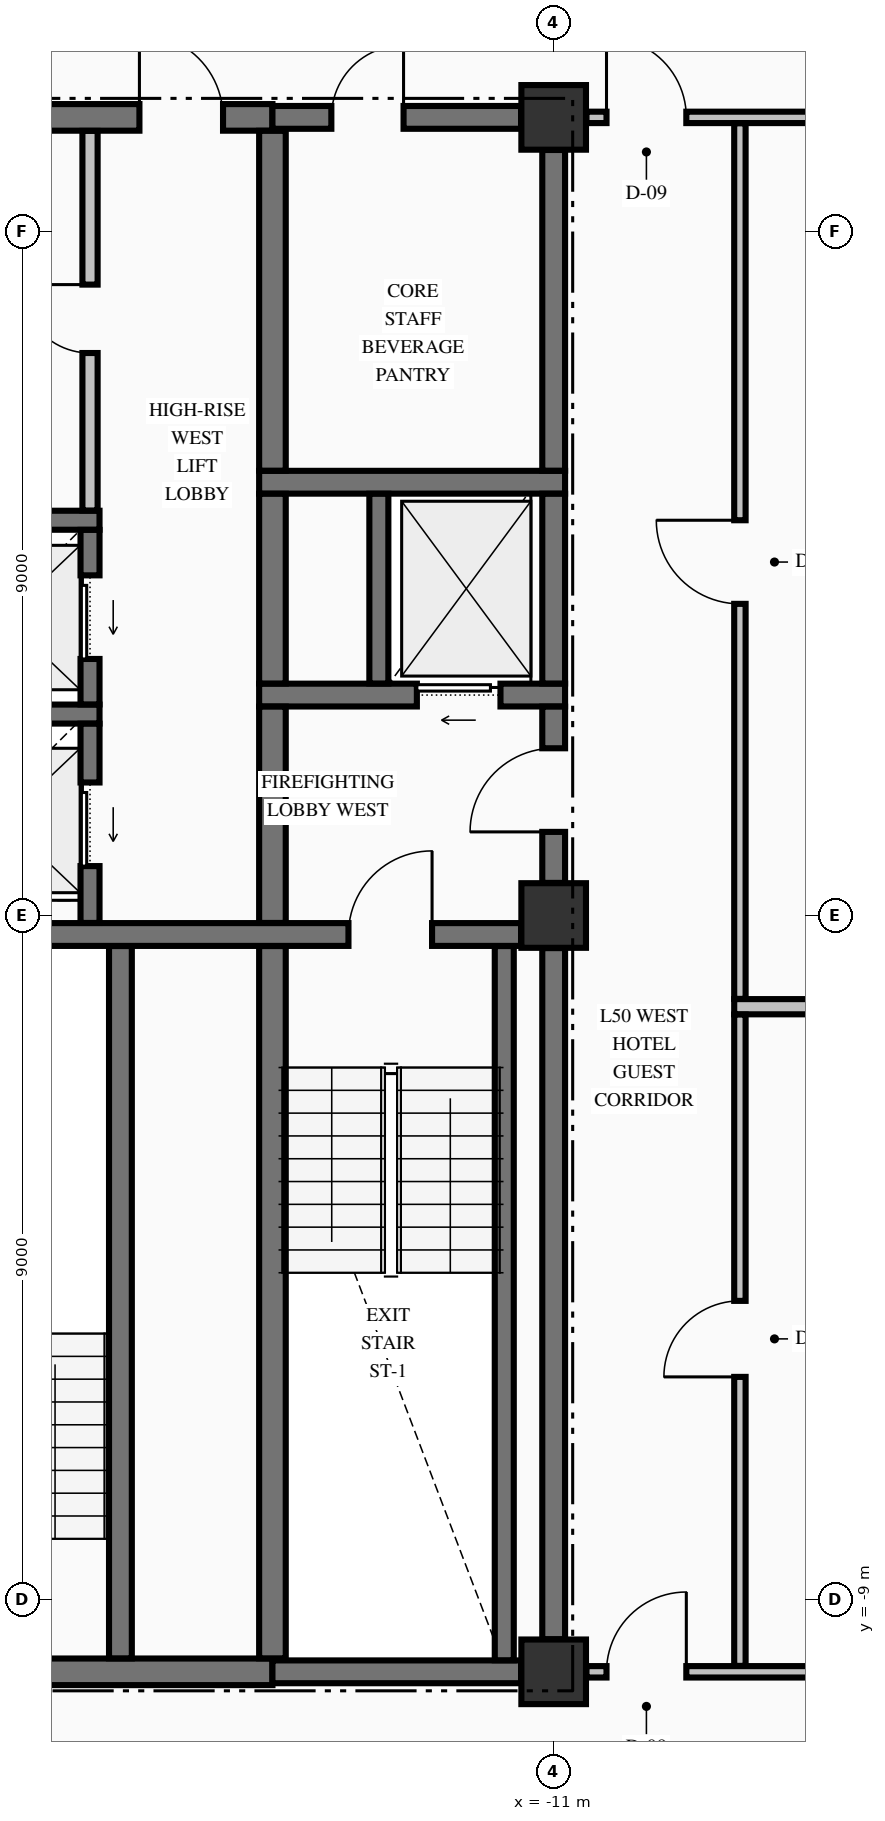
"""IFC4 building model, lengths in metres.
Left out: names, types, materials, properties, quantities, classifications, styles, units other than length and angle.
Written with IfcOpenShell. Run it as: python <this file> out.ifc"""

import sys

from ifc_helpers import new_model, si_unit, direction, frame, frame_2d, origin, origin_2d, place, context, subcontext, project, spatial, rectangle, extrude, element, fill, save


model = new_model("IFC4")
c1 = context("Model", 3, precision=1e-05, world=origin(), true_north=direction((0.0, 1.0)))
c2 = subcontext(c1, "Body", "Model", "MODEL_VIEW")
j1 = project(units=[si_unit("LENGTHUNIT", "METRE"), si_unit("PLANEANGLEUNIT", "RADIAN")], contexts=[c1])
p1 = place(None, origin())
s1 = spatial("IfcSite", under=j1, at=p1, CompositionType="ELEMENT")
p2 = place(p1, origin())
s2 = spatial("IfcBuilding", under=s1, at=p2, CompositionType="ELEMENT")
p3 = place(p2, frame((0.0, 0.0, 194.86)))
s3 = spatial("IfcBuildingStorey", under=s2, at=p3, CompositionType="ELEMENT", Elevation=194.86)
for number, where, z_axis, x_axis in (
    (1, (-11.0, -9.95, -0.275), (0.0, 0.0, 1.0), (1.0, 0.0, 0.0)),
    (2, (-11.0, 0.0, -0.275), (0.0, 0.0, 1.0), (1.0, 0.0, 0.0)),
    (3, (-11.0, 10.5, -0.275), (0.0, 0.0, 1.0), (1.0, 0.0, 0.0)),
):
    element("IfcColumn", number, at=place(p3, frame(where, z_axis=z_axis, x_axis=x_axis)), inside=s3, PredefinedType="COLUMN", context=c2, shape_type="SweptSolid", body=[
        extrude(rectangle(XDim=0.85, YDim=0.85, at=origin_2d()), origin(), (0.0, 0.0, 1.0), 3.425),
    ])
p4 = place(p3, frame((-19.571, -9.95, 0.0), z_axis=(0.0, 0.0, 1.0), x_axis=(1.0, 0.0, 0.0)))
e4 = element("IfcWall", 4, at=p4, inside=s3, PredefinedType="SHEAR", context=c2, shape_type="SweptSolid", body=[
    extrude(rectangle(XDim=4.871, YDim=0.35, at=frame_2d((2.436, 0.0))), origin(), (0.0, 0.0, 1.0), 3.15),
])
p5 = place(p4, frame((0.746, 0.0, 0.0)))
e5 = element("IfcOpeningElement", 5, at=p5, cuts=e4, PredefinedType="OPENING", context=c2, shape_type="SweptSolid", body=[
    extrude(rectangle(XDim=1.05, YDim=2.15, at=frame_2d((0.525, 1.075))), frame((0.0, 0.185, 0.0), z_axis=(0.0, -1.0, 0.0), x_axis=(1.0, 0.0, 0.0)), (0.0, 0.0, 1.0), 0.37),
])
p6 = place(p3, frame((-14.7, -9.95, 0.0), z_axis=(0.0, 0.0, 1.0), x_axis=(1.0, 0.0, 0.0)))
e6 = element("IfcWall", 6, at=p6, inside=s3, PredefinedType="SHEAR", context=c2, shape_type="SweptSolid", body=[
    extrude(rectangle(XDim=3.271, YDim=0.3, at=frame_2d((1.635, 0.0))), origin(), (0.0, 0.0, 1.0), 3.15),
])
p7 = place(p3, frame((-19.571, -0.25, 0.0), z_axis=(0.0, 0.0, 1.0), x_axis=(1.0, 0.0, 0.0)))
e7 = element("IfcWall", 7, at=p7, inside=s3, PredefinedType="SHEAR", context=c2, shape_type="SweptSolid", body=[
    extrude(rectangle(XDim=8.142, YDim=0.3, at=frame_2d((4.071, 0.0))), origin(), (0.0, 0.0, 1.0), 3.15),
])
p8 = place(p7, frame((5.871, 0.0, 0.0)))
e8 = element("IfcOpeningElement", 8, at=p8, cuts=e7, PredefinedType="OPENING", context=c2, shape_type="SweptSolid", body=[
    extrude(rectangle(XDim=1.1, YDim=2.15, at=frame_2d((0.55, 1.075))), frame((0.0, 0.16, 0.0), z_axis=(0.0, -1.0, 0.0), x_axis=(1.0, 0.0, 0.0)), (0.0, 0.0, 1.0), 0.32),
])
p9 = place(p3, frame((-20.175, 2.65, 0.0), z_axis=(0.0, 0.0, 1.0), x_axis=(1.0, 0.0, 0.0)))
e9 = element("IfcWall", 9, at=p9, inside=s3, PredefinedType="SOLIDWALL", context=c2, shape_type="SweptSolid", body=[
    extrude(rectangle(XDim=3.2, YDim=0.25, at=frame_2d((1.6, 0.0))), origin(), (0.0, 0.0, 1.0), 3.15),
])
p10 = place(p3, frame((-14.875, 2.9, 0.0), z_axis=(0.0, 0.0, 1.0), x_axis=(1.0, 0.0, 0.0)))
e10 = element("IfcWall", 10, at=p10, inside=s3, PredefinedType="SHEAR", context=c2, shape_type="SweptSolid", body=[
    extrude(rectangle(XDim=4.025, YDim=0.3, at=frame_2d((2.012, 0.0))), origin(), (0.0, 0.0, 1.0), 3.15),
])
p11 = place(p10, frame((2.075, 0.0, 0.0)))
e11 = element("IfcOpeningElement", 11, at=p11, cuts=e10, PredefinedType="OPENING", context=c2, shape_type="SweptSolid", body=[
    extrude(rectangle(XDim=1.1, YDim=2.2, at=frame_2d((0.55, 1.1))), frame((0.0, 0.16, 0.0), z_axis=(0.0, -1.0, 0.0), x_axis=(1.0, 0.0, 0.0)), (0.0, 0.0, 1.0), 0.32),
])
p12 = place(p3, frame((-20.175, 5.2, 0.0), z_axis=(0.0, 0.0, 1.0), x_axis=(1.0, 0.0, 0.0)))
e12 = element("IfcWall", 12, at=p12, inside=s3, PredefinedType="SOLIDWALL", context=c2, shape_type="SweptSolid", body=[
    extrude(rectangle(XDim=3.2, YDim=0.25, at=frame_2d((1.6, 0.0))), origin(), (0.0, 0.0, 1.0), 3.15),
])
p13 = place(p3, frame((-14.875, 5.7, 0.0), z_axis=(0.0, 0.0, 1.0), x_axis=(1.0, 0.0, 0.0)))
e13 = element("IfcWall", 13, at=p13, inside=s3, PredefinedType="SHEAR", context=c2, shape_type="SweptSolid", body=[
    extrude(rectangle(XDim=4.025, YDim=0.3, at=frame_2d((2.012, 0.0))), origin(), (0.0, 0.0, 1.0), 3.15),
])
p14 = place(p3, frame((-19.571, 10.5, 0.0), z_axis=(0.0, 0.0, 1.0), x_axis=(1.0, 0.0, 0.0)))
e14 = element("IfcWall", 14, at=p14, inside=s3, PredefinedType="SHEAR", context=c2, shape_type="SweptSolid", body=[
    extrude(rectangle(XDim=4.871, YDim=0.35, at=frame_2d((2.436, 0.0))), origin(), (0.0, 0.0, 1.0), 3.15),
])
p15 = place(p14, frame((3.121, 0.0, 0.0)))
e15 = element("IfcOpeningElement", 15, at=p15, cuts=e14, PredefinedType="OPENING", context=c2, shape_type="SweptSolid", body=[
    extrude(rectangle(XDim=1.1, YDim=2.15, at=frame_2d((0.55, 1.075))), frame((0.0, 0.185, 0.0), z_axis=(0.0, -1.0, 0.0), x_axis=(1.0, 0.0, 0.0)), (0.0, 0.0, 1.0), 0.37),
])
p16 = place(p3, frame((-14.7, 10.5, 0.0), z_axis=(0.0, 0.0, 1.0), x_axis=(1.0, 0.0, 0.0)))
e16 = element("IfcWall", 16, at=p16, inside=s3, PredefinedType="SHEAR", context=c2, shape_type="SweptSolid", body=[
    extrude(rectangle(XDim=3.271, YDim=0.3, at=frame_2d((1.635, 0.0))), origin(), (0.0, 0.0, 1.0), 3.15),
])
p17 = place(p16, frame((0.775, 0.0, 0.0)))
e17 = element("IfcOpeningElement", 17, at=p17, cuts=e16, PredefinedType="OPENING", context=c2, shape_type="SweptSolid", body=[
    extrude(rectangle(XDim=0.95, YDim=2.15, at=frame_2d((0.475, 1.075))), frame((0.0, 0.16, 0.0), z_axis=(0.0, -1.0, 0.0), x_axis=(1.0, 0.0, 0.0)), (0.0, 0.0, 1.0), 0.32),
])
p18 = place(p3, frame((-10.569, -9.95, 0.0), z_axis=(0.0, 0.0, 1.0), x_axis=(1.0, 0.0, 0.0)))
e18 = element("IfcWall", 18, at=p18, inside=s3, PredefinedType="PARTITIONING", context=c2, shape_type="SweptSolid", body=[
    extrude(rectangle(XDim=21.138, YDim=0.15, at=frame_2d((10.569, 0.0))), origin(), (0.0, 0.0, 1.0), 3.15),
])
p19 = place(p18, frame((0.264, 0.0, 0.0)))
e19 = element("IfcOpeningElement", 19, at=p19, cuts=e18, PredefinedType="OPENING", context=c2, shape_type="SweptSolid", body=[
    extrude(rectangle(XDim=1.05, YDim=2.15, at=frame_2d((0.525, 1.075))), frame((0.0, 0.085, 0.0), z_axis=(0.0, -1.0, 0.0), x_axis=(1.0, 0.0, 0.0)), (0.0, 0.0, 1.0), 0.17),
])
p20 = place(p18, frame((19.824, 0.0, 0.0)))
e20 = element("IfcOpeningElement", 20, at=p20, cuts=e18, PredefinedType="OPENING", context=c2, shape_type="SweptSolid", body=[
    extrude(rectangle(XDim=1.05, YDim=2.15, at=frame_2d((0.525, 1.075))), frame((0.0, 0.085, 0.0), z_axis=(0.0, -1.0, 0.0), x_axis=(1.0, 0.0, 0.0)), (0.0, 0.0, 1.0), 0.17),
])
p21 = place(p18, frame((12.874, 0.0, 0.0)))
e21 = element("IfcOpeningElement", 21, at=p21, cuts=e18, PredefinedType="OPENING", context=c2, shape_type="SweptSolid", body=[
    extrude(rectangle(XDim=0.95, YDim=2.15, at=frame_2d((0.475, 1.075))), frame((0.0, 0.085, 0.0), z_axis=(0.0, -1.0, 0.0), x_axis=(1.0, 0.0, 0.0)), (0.0, 0.0, 1.0), 0.17),
])
p22 = place(p3, frame((-8.625, -1.2, 0.0), z_axis=(0.0, 0.0, 1.0), x_axis=(1.0, 0.0, 0.0)))
e22 = element("IfcWall", 22, at=p22, inside=s3, PredefinedType="PARTITIONING", context=c2, shape_type="SweptSolid", body=[
    extrude(rectangle(XDim=8.725, YDim=0.2, at=frame_2d((4.363, 0.0))), origin(), (0.0, 0.0, 1.0), 3.15),
])
p23 = place(p3, frame((-10.569, 10.5, 0.0), z_axis=(0.0, 0.0, 1.0), x_axis=(1.0, 0.0, 0.0)))
e23 = element("IfcWall", 23, at=p23, inside=s3, PredefinedType="PARTITIONING", context=c2, shape_type="SweptSolid", body=[
    extrude(rectangle(XDim=21.138, YDim=0.15, at=frame_2d((10.569, 0.0))), origin(), (0.0, 0.0, 1.0), 3.15),
])
p24 = place(p23, frame((0.264, 0.0, 0.0)))
e24 = element("IfcOpeningElement", 24, at=p24, cuts=e23, PredefinedType="OPENING", context=c2, shape_type="SweptSolid", body=[
    extrude(rectangle(XDim=1.05, YDim=2.15, at=frame_2d((0.525, 1.075))), frame((0.0, 0.085, 0.0), z_axis=(0.0, -1.0, 0.0), x_axis=(1.0, 0.0, 0.0)), (0.0, 0.0, 1.0), 0.17),
])
p25 = place(p23, frame((19.824, 0.0, 0.0)))
e25 = element("IfcOpeningElement", 25, at=p25, cuts=e23, PredefinedType="OPENING", context=c2, shape_type="SweptSolid", body=[
    extrude(rectangle(XDim=1.05, YDim=2.15, at=frame_2d((0.525, 1.075))), frame((0.0, 0.085, 0.0), z_axis=(0.0, -1.0, 0.0), x_axis=(1.0, 0.0, 0.0)), (0.0, 0.0, 1.0), 0.17),
])
p26 = place(p3, frame((-17.1, -0.098, 0.0), z_axis=(0.0, 0.0, 1.0), x_axis=(0.0, 1.0, 0.0)))
e26 = element("IfcWall", 26, at=p26, inside=s3, PredefinedType="SOLIDWALL", context=c2, shape_type="SweptSolid", body=[
    extrude(rectangle(XDim=2.621, YDim=0.25, at=frame_2d((1.311, 0.0))), origin(), (0.0, 0.0, 1.0), 3.15),
])
p27 = place(p26, frame((0.748, 0.0, 0.0)))
e27 = element("IfcOpeningElement", 27, at=p27, cuts=e26, PredefinedType="OPENING", context=c2, shape_type="SweptSolid", body=[
    extrude(rectangle(XDim=1.1, YDim=2.2, at=frame_2d((0.55, 1.1))), frame((0.0, 0.135, 0.0), z_axis=(0.0, -1.0, 0.0), x_axis=(1.0, 0.0, 0.0)), (0.0, 0.0, 1.0), 0.27),
])
p28 = place(p3, frame((-17.1, 2.777, 0.0), z_axis=(0.0, 0.0, 1.0), x_axis=(0.0, 1.0, 0.0)))
e28 = element("IfcWall", 28, at=p28, inside=s3, PredefinedType="SOLIDWALL", context=c2, shape_type="SweptSolid", body=[
    extrude(rectangle(XDim=2.296, YDim=0.25, at=frame_2d((1.148, 0.0))), origin(), (0.0, 0.0, 1.0), 3.15),
])
p29 = place(p28, frame((0.598, 0.0, 0.0)))
e29 = element("IfcOpeningElement", 29, at=p29, cuts=e28, PredefinedType="OPENING", context=c2, shape_type="SweptSolid", body=[
    extrude(rectangle(XDim=1.1, YDim=2.2, at=frame_2d((0.55, 1.1))), frame((0.0, 0.135, 0.0), z_axis=(0.0, -1.0, 0.0), x_axis=(1.0, 0.0, 0.0)), (0.0, 0.0, 1.0), 0.27),
])
p30 = place(p3, frame((-16.7, -9.773, 0.0), z_axis=(0.0, 0.0, 1.0), x_axis=(0.0, 1.0, 0.0)))
e30 = element("IfcWall", 30, at=p30, inside=s3, PredefinedType="SHEAR", context=c2, shape_type="SweptSolid", body=[
    extrude(rectangle(XDim=9.371, YDim=0.3, at=frame_2d((4.686, 0.0))), origin(), (0.0, 0.0, 1.0), 3.15),
])
p31 = place(p3, frame((-14.7, -9.773, 0.0), z_axis=(0.0, 0.0, 1.0), x_axis=(0.0, 1.0, 0.0)))
e31 = element("IfcWall", 31, at=p31, inside=s3, PredefinedType="SHEAR", context=c2, shape_type="SweptSolid", body=[
    extrude(rectangle(XDim=9.371, YDim=0.35, at=frame_2d((4.686, 0.0))), origin(), (0.0, 0.0, 1.0), 3.15),
])
p32 = place(p3, frame((-14.7, -0.098, 0.0), z_axis=(0.0, 0.0, 1.0), x_axis=(0.0, 1.0, 0.0)))
e32 = element("IfcWall", 32, at=p32, inside=s3, PredefinedType="SHEAR", context=c2, shape_type="SweptSolid", body=[
    extrude(rectangle(XDim=2.846, YDim=0.35, at=frame_2d((1.423, 0.0))), origin(), (0.0, 0.0, 1.0), 3.15),
])
p33 = place(p3, frame((-14.7, 3.052, 0.0), z_axis=(0.0, 0.0, 1.0), x_axis=(0.0, 1.0, 0.0)))
e33 = element("IfcWall", 33, at=p33, inside=s3, PredefinedType="SHEAR", context=c2, shape_type="SweptSolid", body=[
    extrude(rectangle(XDim=2.496, YDim=0.35, at=frame_2d((1.248, 0.0))), origin(), (0.0, 0.0, 1.0), 3.15),
])
p34 = place(p3, frame((-14.7, 5.852, 0.0), z_axis=(0.0, 0.0, 1.0), x_axis=(0.0, 1.0, 0.0)))
e34 = element("IfcWall", 34, at=p34, inside=s3, PredefinedType="SHEAR", context=c2, shape_type="SweptSolid", body=[
    extrude(rectangle(XDim=4.471, YDim=0.35, at=frame_2d((2.235, 0.0))), origin(), (0.0, 0.0, 1.0), 3.15),
])
p35 = place(p3, frame((-13.3, 3.052, 0.0), z_axis=(0.0, 0.0, 1.0), x_axis=(0.0, 1.0, 0.0)))
e35 = element("IfcWall", 35, at=p35, inside=s3, PredefinedType="SOLIDWALL", context=c2, shape_type="SweptSolid", body=[
    extrude(rectangle(XDim=2.496, YDim=0.25, at=frame_2d((1.248, 0.0))), origin(), (0.0, 0.0, 1.0), 3.15),
])
p36 = place(p3, frame((-11.65, -9.798, 0.0), z_axis=(0.0, 0.0, 1.0), x_axis=(0.0, 1.0, 0.0)))
e36 = element("IfcWall", 36, at=p36, inside=s3, PredefinedType="SOLIDWALL", context=c2, shape_type="SweptSolid", body=[
    extrude(rectangle(XDim=9.396, YDim=0.25, at=frame_2d((4.698, 0.0))), origin(), (0.0, 0.0, 1.0), 3.15),
])
p37 = place(p3, frame((-11.0, -9.521, 0.0), z_axis=(0.0, 0.0, 1.0), x_axis=(0.0, 1.0, 0.0)))
e37 = element("IfcWall", 37, at=p37, inside=s3, PredefinedType="SHEAR", context=c2, shape_type="SweptSolid", body=[
    extrude(rectangle(XDim=9.092, YDim=0.3, at=frame_2d((4.546, 0.0))), origin(), (0.0, 0.0, 1.0), 3.15),
])
p38 = place(p3, frame((-11.0, 0.429, 0.0), z_axis=(0.0, 0.0, 1.0), x_axis=(0.0, 1.0, 0.0)))
e38 = element("IfcWall", 38, at=p38, inside=s3, PredefinedType="SHEAR", context=c2, shape_type="SweptSolid", body=[
    extrude(rectangle(XDim=2.319, YDim=0.3, at=frame_2d((1.16, 0.0))), origin(), (0.0, 0.0, 1.0), 3.15),
])
p39 = place(p38, frame((0.671, 0.0, 0.0)))
e39 = element("IfcOpeningElement", 39, at=p39, cuts=e38, PredefinedType="OPENING", context=c2, shape_type="SweptSolid", body=[
    extrude(rectangle(XDim=1.1, YDim=2.15, at=frame_2d((0.55, 1.075))), frame((0.0, 0.16, 0.0), z_axis=(0.0, -1.0, 0.0), x_axis=(1.0, 0.0, 0.0)), (0.0, 0.0, 1.0), 0.32),
])
p40 = place(p3, frame((-11.0, 3.052, 0.0), z_axis=(0.0, 0.0, 1.0), x_axis=(0.0, 1.0, 0.0)))
e40 = element("IfcWall", 40, at=p40, inside=s3, PredefinedType="SHEAR", context=c2, shape_type="SweptSolid", body=[
    extrude(rectangle(XDim=2.496, YDim=0.3, at=frame_2d((1.248, 0.0))), origin(), (0.0, 0.0, 1.0), 3.15),
])
p41 = place(p3, frame((-11.0, 5.852, 0.0), z_axis=(0.0, 0.0, 1.0), x_axis=(0.0, 1.0, 0.0)))
e41 = element("IfcWall", 41, at=p41, inside=s3, PredefinedType="SHEAR", context=c2, shape_type="SweptSolid", body=[
    extrude(rectangle(XDim=4.219, YDim=0.3, at=frame_2d((2.109, 0.0))), origin(), (0.0, 0.0, 1.0), 3.15),
])
p42 = place(p3, frame((-17.1, 5.328, 0.0), z_axis=(0.0, 0.0, 1.0), x_axis=(0.0, 1.0, 0.0)))
e42 = element("IfcWall", 42, at=p42, inside=s3, PredefinedType="PARTITIONING", context=c2, shape_type="SweptSolid", body=[
    extrude(rectangle(XDim=4.994, YDim=0.2, at=frame_2d((2.497, 0.0))), origin(), (0.0, 0.0, 1.0), 3.15),
])
p43 = place(p42, frame((2.072, 0.0, 0.0)))
e43 = element("IfcOpeningElement", 43, at=p43, cuts=e42, PredefinedType="OPENING", context=c2, shape_type="SweptSolid", body=[
    extrude(rectangle(XDim=0.9, YDim=2.15, at=frame_2d((0.45, 1.075))), frame((0.0, 0.11, 0.0), z_axis=(0.0, -1.0, 0.0), x_axis=(1.0, 0.0, 0.0)), (0.0, 0.0, 1.0), 0.22),
])
p44 = place(p3, frame((-8.55, -9.872, 0.0), z_axis=(0.0, 0.0, 1.0), x_axis=(0.0, 1.0, 0.0)))
e44 = element("IfcWall", 44, at=p44, inside=s3, PredefinedType="PARTITIONING", context=c2, shape_type="SweptSolid", body=[
    extrude(rectangle(XDim=8.569, YDim=0.15, at=frame_2d((4.285, 0.0))), origin(), (0.0, 0.0, 1.0), 3.15),
])
p45 = place(p44, frame((3.802, 0.0, 0.0)))
e45 = element("IfcOpeningElement", 45, at=p45, cuts=e44, PredefinedType="OPENING", context=c2, shape_type="SweptSolid", body=[
    extrude(rectangle(XDim=1.0, YDim=2.15, at=frame_2d((0.5, 1.075))), frame((0.0, 0.085, 0.0), z_axis=(0.0, -1.0, 0.0), x_axis=(1.0, 0.0, 0.0)), (0.0, 0.0, 1.0), 0.17),
])
p46 = place(p3, frame((-8.55, -1.097, 0.0), z_axis=(0.0, 0.0, 1.0), x_axis=(0.0, 1.0, 0.0)))
e46 = element("IfcWall", 46, at=p46, inside=s3, PredefinedType="PARTITIONING", context=c2, shape_type="SweptSolid", body=[
    extrude(rectangle(XDim=11.519, YDim=0.15, at=frame_2d((5.76, 0.0))), origin(), (0.0, 0.0, 1.0), 3.15),
])
p47 = place(p46, frame((5.197, 0.0, 0.0)))
e47 = element("IfcOpeningElement", 47, at=p47, cuts=e46, PredefinedType="OPENING", context=c2, shape_type="SweptSolid", body=[
    extrude(rectangle(XDim=1.1, YDim=2.15, at=frame_2d((0.55, 1.075))), frame((0.0, 0.085, 0.0), z_axis=(0.0, -1.0, 0.0), x_axis=(1.0, 0.0, 0.0)), (0.0, 0.0, 1.0), 0.17),
])
p48 = place(p8, origin())
e48 = element("IfcDoor", 48, at=p48, inside=s3, OperationType="SINGLE_SWING_RIGHT", PredefinedType="DOOR", context=c2, shape_type="SweptSolid", body=[
    extrude(rectangle(XDim=1.1, YDim=2.15, at=frame_2d((0.55, 1.075))), frame((0.0, 0.025, 0.0), z_axis=(0.0, -1.0, 0.0), x_axis=(1.0, 0.0, 0.0)), (0.0, 0.0, 1.0), 0.05),
])
fill(e8, e48)
p49 = place(p39, origin())
e49 = element("IfcDoor", 49, at=p49, inside=s3, OperationType="SINGLE_SWING_LEFT", PredefinedType="DOOR", context=c2, shape_type="SweptSolid", body=[
    extrude(rectangle(XDim=1.1, YDim=2.15, at=frame_2d((0.55, 1.075))), frame((0.0, 0.025, 0.0), z_axis=(0.0, -1.0, 0.0), x_axis=(1.0, 0.0, 0.0)), (0.0, 0.0, 1.0), 0.05),
])
fill(e39, e49)
p50 = place(p11, origin())
e50 = element("IfcDoor", 50, at=p50, inside=s3, OperationType="SLIDING_TO_LEFT", PredefinedType="DOOR", context=c2, shape_type="SweptSolid", body=[
    extrude(rectangle(XDim=1.1, YDim=2.2, at=frame_2d((0.55, 1.1))), frame((0.0, 0.025, 0.0), z_axis=(0.0, -1.0, 0.0), x_axis=(1.0, 0.0, 0.0)), (0.0, 0.0, 1.0), 0.05),
])
fill(e11, e50)
p51 = place(p17, origin())
e51 = element("IfcDoor", 51, at=p51, inside=s3, OperationType="SINGLE_SWING_RIGHT", PredefinedType="DOOR", context=c2, shape_type="SweptSolid", body=[
    extrude(rectangle(XDim=0.95, YDim=2.15, at=frame_2d((0.475, 1.075))), frame((0.0, 0.025, 0.0), z_axis=(0.0, -1.0, 0.0), x_axis=(1.0, 0.0, 0.0)), (0.0, 0.0, 1.0), 0.05),
])
fill(e17, e51)
p52 = place(p27, origin())
e52 = element("IfcDoor", 52, at=p52, inside=s3, OperationType="SLIDING_TO_LEFT", PredefinedType="DOOR", context=c2, shape_type="SweptSolid", body=[
    extrude(rectangle(XDim=1.1, YDim=2.2, at=frame_2d((0.55, 1.1))), frame((0.0, 0.025, 0.0), z_axis=(0.0, -1.0, 0.0), x_axis=(1.0, 0.0, 0.0)), (0.0, 0.0, 1.0), 0.05),
])
fill(e27, e52)
p53 = place(p29, origin())
e53 = element("IfcDoor", 53, at=p53, inside=s3, OperationType="SLIDING_TO_LEFT", PredefinedType="DOOR", context=c2, shape_type="SweptSolid", body=[
    extrude(rectangle(XDim=1.1, YDim=2.2, at=frame_2d((0.55, 1.1))), frame((0.0, 0.025, 0.0), z_axis=(0.0, -1.0, 0.0), x_axis=(1.0, 0.0, 0.0)), (0.0, 0.0, 1.0), 0.05),
])
fill(e29, e53)
p54 = place(p15, origin())
e54 = element("IfcDoor", 54, at=p54, inside=s3, OperationType="SINGLE_SWING_LEFT", PredefinedType="DOOR", context=c2, shape_type="SweptSolid", body=[
    extrude(rectangle(XDim=1.1, YDim=2.15, at=frame_2d((0.55, 1.075))), frame((0.0, 0.025, 0.0), z_axis=(0.0, -1.0, 0.0), x_axis=(1.0, 0.0, 0.0)), (0.0, 0.0, 1.0), 0.05),
])
fill(e15, e54)
p55 = place(p43, origin())
e55 = element("IfcDoor", 55, at=p55, inside=s3, OperationType="SINGLE_SWING_RIGHT", PredefinedType="DOOR", context=c2, shape_type="SweptSolid", body=[
    extrude(rectangle(XDim=0.9, YDim=2.15, at=frame_2d((0.45, 1.075))), frame((0.0, 0.025, 0.0), z_axis=(0.0, -1.0, 0.0), x_axis=(1.0, 0.0, 0.0)), (0.0, 0.0, 1.0), 0.05),
])
fill(e43, e55)
p56 = place(p24, origin())
e56 = element("IfcDoor", 56, at=p56, inside=s3, OperationType="SINGLE_SWING_LEFT", PredefinedType="DOOR", context=c2, shape_type="SweptSolid", body=[
    extrude(rectangle(XDim=1.05, YDim=2.15, at=frame_2d((0.525, 1.075))), frame((0.0, 0.025, 0.0), z_axis=(0.0, -1.0, 0.0), x_axis=(1.0, 0.0, 0.0)), (0.0, 0.0, 1.0), 0.05),
])
fill(e24, e56)
p57 = place(p19, origin())
e57 = element("IfcDoor", 57, at=p57, inside=s3, OperationType="SINGLE_SWING_RIGHT", PredefinedType="DOOR", context=c2, shape_type="SweptSolid", body=[
    extrude(rectangle(XDim=1.05, YDim=2.15, at=frame_2d((0.525, 1.075))), frame((0.0, 0.025, 0.0), z_axis=(0.0, -1.0, 0.0), x_axis=(1.0, 0.0, 0.0)), (0.0, 0.0, 1.0), 0.05),
])
fill(e19, e57)
p58 = place(p47, origin())
e58 = element("IfcDoor", 58, at=p58, inside=s3, OperationType="SINGLE_SWING_RIGHT", PredefinedType="DOOR", context=c2, shape_type="SweptSolid", body=[
    extrude(rectangle(XDim=1.1, YDim=2.15, at=frame_2d((0.55, 1.075))), frame((0.0, 0.025, 0.0), z_axis=(0.0, -1.0, 0.0), x_axis=(1.0, 0.0, 0.0)), (0.0, 0.0, 1.0), 0.05),
])
fill(e47, e58)
p59 = place(p45, origin())
e59 = element("IfcDoor", 59, at=p59, inside=s3, OperationType="SINGLE_SWING_LEFT", PredefinedType="DOOR", context=c2, shape_type="SweptSolid", body=[
    extrude(rectangle(XDim=1.0, YDim=2.15, at=frame_2d((0.5, 1.075))), frame((0.0, 0.025, 0.0), z_axis=(0.0, -1.0, 0.0), x_axis=(1.0, 0.0, 0.0)), (0.0, 0.0, 1.0), 0.05),
])
fill(e45, e59)
save(model, sys.argv[1])
